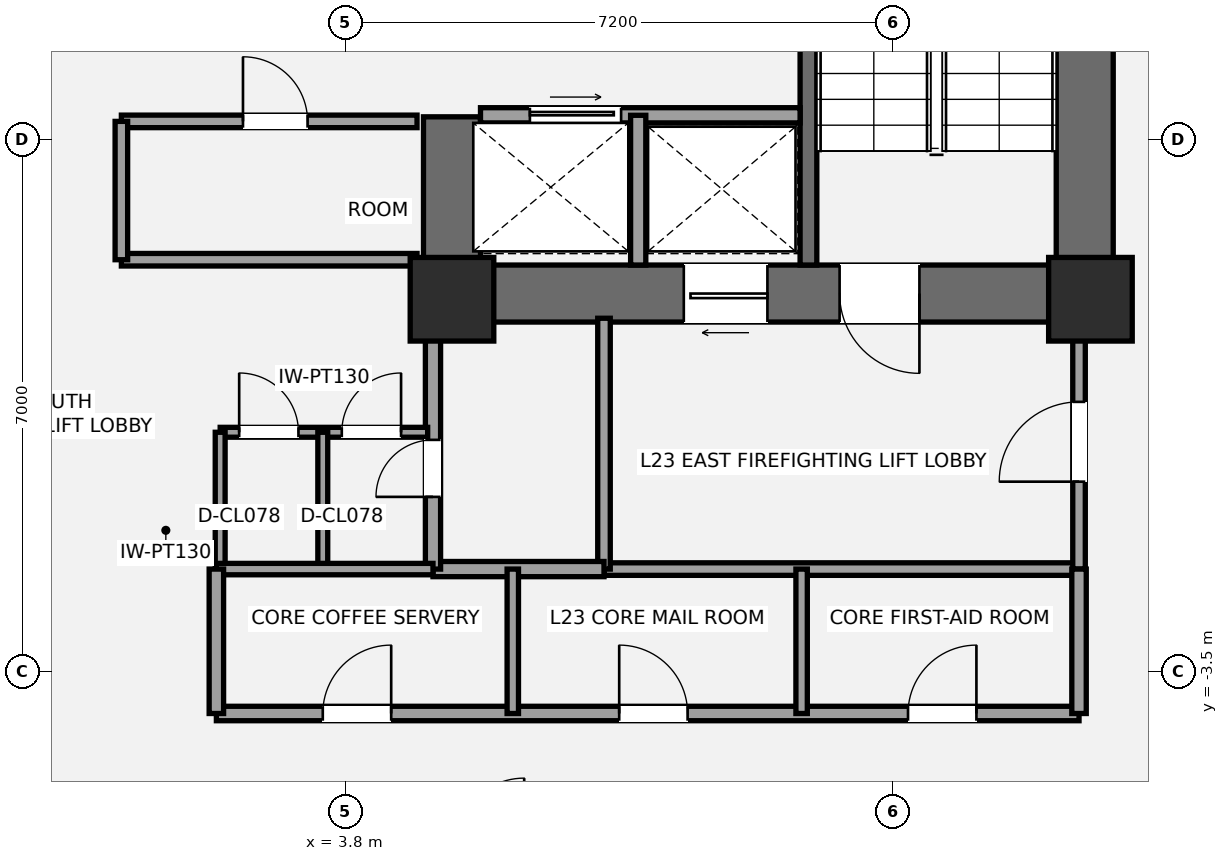
"""IFC4 building model, lengths in metres.
Left out: names, types, materials, properties, quantities, classifications, styles, units other than length and angle.
Written with IfcOpenShell. Run it as: python <this file> out.ifc"""

import sys

from ifc_helpers import new_model, si_unit, direction, frame, frame_2d, origin, origin_2d, place, context, subcontext, project, spatial, rectangle, extrude, element, fill, save


model = new_model("IFC4")
c1 = context("Model", 3, precision=1e-05, world=origin(), true_north=direction((0.0, 1.0)))
c2 = subcontext(c1, "Body", "Model", "MODEL_VIEW")
j1 = project(units=[si_unit("LENGTHUNIT", "METRE"), si_unit("PLANEANGLEUNIT", "RADIAN")], contexts=[c1])
p1 = place(None, origin())
s1 = spatial("IfcSite", under=j1, at=p1, CompositionType="ELEMENT")
p2 = place(p1, origin())
s2 = spatial("IfcBuilding", under=s1, at=p2, CompositionType="ELEMENT")
p3 = place(p2, frame((0.0, 0.0, 89.6)))
s3 = spatial("IfcBuildingStorey", under=s2, at=p3, CompositionType="ELEMENT", Elevation=89.6)
p4 = place(p3, frame((13.525, 1.1, 0.0), z_axis=(0.0, 0.0, 1.0), x_axis=(0.0, 1.0, 0.0)))
e1 = element("IfcWall", 1, at=p4, inside=s3, PredefinedType="SHEAR", context=c2, shape_type="SweptSolid", body=[
    extrude(rectangle(XDim=8.65, YDim=0.75, at=frame_2d((4.325, 0.0))), origin(), (0.0, 0.0, 1.0), 3.5),
])
p5 = place(p3, frame((13.9, 1.475, 0.0), z_axis=(0.0, 0.0, 1.0), x_axis=(-1.0, 0.0, 0.0)))
e2 = element("IfcWall", 2, at=p5, inside=s3, PredefinedType="SHEAR", context=c2, shape_type="SweptSolid", body=[
    extrude(rectangle(XDim=9.075, YDim=0.75, at=frame_2d((4.538, 0.0))), origin(), (0.0, 0.0, 1.0), 3.5),
])
p6 = place(p5, frame((2.55, 0.0, 0.0)))
e3 = element("IfcOpeningElement", 3, at=p6, cuts=e2, PredefinedType="OPENING", context=c2, shape_type="SweptSolid", body=[
    extrude(rectangle(XDim=1.05, YDim=2.15, at=frame_2d((0.525, 1.075))), frame((0.0, 0.385, 0.0), z_axis=(0.0, -1.0, 0.0), x_axis=(1.0, 0.0, 0.0)), (0.0, 0.0, 1.0), 0.77),
])
p7 = place(p5, frame((4.55, 0.0, 0.0)))
e4 = element("IfcOpeningElement", 4, at=p7, cuts=e2, PredefinedType="OPENING", context=c2, shape_type="SweptSolid", body=[
    extrude(rectangle(XDim=1.1, YDim=2.2, at=frame_2d((0.55, 1.1))), frame((0.0, 0.385, 0.0), z_axis=(0.0, -1.0, 0.0), x_axis=(1.0, 0.0, 0.0)), (0.0, 0.0, 1.0), 0.77),
])
p8 = place(p3, frame((5.2, 1.1, 0.0), z_axis=(0.0, 0.0, 1.0), x_axis=(0.0, 1.0, 0.0)))
e5 = element("IfcWall", 5, at=p8, inside=s3, PredefinedType="SHEAR", context=c2, shape_type="SweptSolid", body=[
    extrude(rectangle(XDim=2.7, YDim=0.75, at=frame_2d((1.35, 0.0))), origin(), (0.0, 0.0, 1.0), 3.5),
])
p9 = place(p3, frame((9.89, 1.85, 0.0), z_axis=(0.0, 0.0, 1.0), x_axis=(0.0, 1.0, 0.0)))
e6 = element("IfcWall", 6, at=p9, inside=s3, PredefinedType="SHEAR", context=c2, shape_type="SweptSolid", body=[
    extrude(rectangle(XDim=7.15, YDim=0.22, at=frame_2d((3.575, 0.0))), origin(), (0.0, 0.0, 1.0), 3.5),
])
for number, where, z_axis, x_axis in (
    (7, (5.2, 1.4, 0.0), (0.0, 0.0, 1.0), (1.0, 0.0, 0.0)),
    (8, (13.6, 1.4, 0.0), (0.0, 0.0, 1.0), (1.0, 0.0, 0.0)),
):
    element("IfcColumn", number, at=place(p3, frame(where, z_axis=z_axis, x_axis=x_axis)), inside=s3, PredefinedType="COLUMN", context=c2, shape_type="SweptSolid", body=[
        extrude(rectangle(XDim=1.1, YDim=1.1, at=origin_2d()), origin(), (0.0, 0.0, 1.0), 3.5),
    ])
p10 = place(p3, frame((7.2, -2.15, 0.0), z_axis=(0.0, 0.0, 1.0), x_axis=(1.0, 0.0, 0.0)))
e9 = element("IfcWall", 9, at=p10, inside=s3, PredefinedType="PARTITIONING", context=c2, shape_type="SweptSolid", body=[
    extrude(rectangle(XDim=6.25, YDim=0.165, at=frame_2d((3.125, 0.0))), origin(), (0.0, 0.0, 1.0), 3.31),
])
p11 = place(p3, frame((7.2, -2.15, 0.0), z_axis=(0.0, 0.0, 1.0), x_axis=(0.0, 1.0, 0.0)))
e10 = element("IfcWall", 10, at=p11, inside=s3, PredefinedType="PARTITIONING", context=c2, shape_type="SweptSolid", body=[
    extrude(rectangle(XDim=3.3, YDim=0.165, at=frame_2d((1.65, 0.0))), origin(), (0.0, 0.0, 1.0), 2.763),
])
p12 = place(p3, frame((13.45, -2.15, 0.0), z_axis=(0.0, 0.0, 1.0), x_axis=(0.0, 1.0, 0.0)))
e11 = element("IfcWall", 11, at=p12, inside=s3, PredefinedType="PARTITIONING", context=c2, shape_type="SweptSolid", body=[
    extrude(rectangle(XDim=3.3, YDim=0.165, at=frame_2d((1.65, 0.0))), origin(), (0.0, 0.0, 1.0), 2.763),
])
p13 = place(p12, frame((1.15, 0.0, 0.0)))
e12 = element("IfcOpeningElement", 12, at=p13, cuts=e11, PredefinedType="OPENING", context=c2, shape_type="SweptSolid", body=[
    extrude(rectangle(XDim=1.05, YDim=2.15, at=frame_2d((0.525, 1.075))), frame((0.0, 0.093, 0.0), z_axis=(0.0, -1.0, 0.0), x_axis=(1.0, 0.0, 0.0)), (0.0, 0.0, 1.0), 0.185),
])
p14 = place(p3, frame((4.95, -2.15, 0.0), z_axis=(0.0, 0.0, 1.0), x_axis=(1.0, 0.0, 0.0)))
e13 = element("IfcWall", 13, at=p14, inside=s3, PredefinedType="SOLIDWALL", context=c2, shape_type="SweptSolid", body=[
    extrude(rectangle(XDim=2.25, YDim=0.2, at=frame_2d((1.125, 0.0))), origin(), (0.0, 0.0, 1.0), 3.31),
])
p15 = place(p3, frame((4.95, -2.15, 0.0), z_axis=(0.0, 0.0, 1.0), x_axis=(0.0, 1.0, 0.0)))
e14 = element("IfcWall", 14, at=p15, inside=s3, PredefinedType="SOLIDWALL", context=c2, shape_type="SweptSolid", body=[
    extrude(rectangle(XDim=3.3, YDim=0.2, at=frame_2d((1.65, 0.0))), origin(), (0.0, 0.0, 1.0), 2.763),
])
p16 = place(p15, frame((0.95, 0.0, 0.0)))
e15 = element("IfcOpeningElement", 15, at=p16, cuts=e14, PredefinedType="OPENING", context=c2, shape_type="SweptSolid", body=[
    extrude(rectangle(XDim=0.75, YDim=2.1, at=frame_2d((0.375, 1.05))), frame((0.0, 0.11, 0.0), z_axis=(0.0, -1.0, 0.0), x_axis=(1.0, 0.0, 0.0)), (0.0, 0.0, 1.0), 0.22),
])
p17 = place(p3, frame((2.15, -0.35, 0.0), z_axis=(0.0, 0.0, 1.0), x_axis=(1.0, 0.0, 0.0)))
e16 = element("IfcWall", 16, at=p17, inside=s3, PredefinedType="PARTITIONING", context=c2, shape_type="SweptSolid", body=[
    extrude(rectangle(XDim=2.73, YDim=0.13, at=frame_2d((1.365, 0.0))), origin(), (0.0, 0.0, 1.0), 3.31),
])
p18 = place(p17, frame((0.25, 0.0, 0.0)))
e17 = element("IfcOpeningElement", 17, at=p18, cuts=e16, PredefinedType="OPENING", context=c2, shape_type="SweptSolid", body=[
    extrude(rectangle(XDim=0.78, YDim=2.1, at=frame_2d((0.39, 1.05))), frame((0.0, 0.075, 0.0), z_axis=(0.0, -1.0, 0.0), x_axis=(1.0, 0.0, 0.0)), (0.0, 0.0, 1.0), 0.15),
])
p19 = place(p17, frame((1.6, 0.0, 0.0)))
e18 = element("IfcOpeningElement", 18, at=p19, cuts=e16, PredefinedType="OPENING", context=c2, shape_type="SweptSolid", body=[
    extrude(rectangle(XDim=0.78, YDim=2.1, at=frame_2d((0.39, 1.05))), frame((0.0, 0.075, 0.0), z_axis=(0.0, -1.0, 0.0), x_axis=(1.0, 0.0, 0.0)), (0.0, 0.0, 1.0), 0.15),
])
for number, where, z_axis, x_axis in (
    (19, (2.15, -2.15, 0.0), (0.0, 0.0, 1.0), (0.0, 1.0, 0.0)),
    (20, (3.5, -2.15, 0.0), (0.0, 0.0, 1.0), (0.0, 1.0, 0.0)),
):
    element("IfcWall", number, at=place(p3, frame(where, z_axis=z_axis, x_axis=x_axis)), inside=s3, PredefinedType="PARTITIONING", context=c2, shape_type="SweptSolid", body=[
        extrude(rectangle(XDim=1.8, YDim=0.13, at=frame_2d((0.9, 0.0))), origin(), (0.0, 0.0, 1.0), 3.31),
    ])
p20 = place(p3, frame((5.575, 3.82, 0.0), z_axis=(0.0, 0.0, 1.0), x_axis=(1.0, 0.0, 0.0)))
e21 = element("IfcWall", 21, at=p20, inside=s3, PredefinedType="SOLIDWALL", context=c2, shape_type="SweptSolid", body=[
    extrude(rectangle(XDim=4.205, YDim=0.2, at=frame_2d((2.103, 0.0))), origin(), (0.0, 0.0, 1.0), 3.31),
])
p21 = place(p20, frame((0.65, 0.0, 0.0)))
e22 = element("IfcOpeningElement", 22, at=p21, cuts=e21, PredefinedType="OPENING", context=c2, shape_type="SweptSolid", body=[
    extrude(rectangle(XDim=1.2, YDim=2.2, at=frame_2d((0.6, 1.1))), frame((0.0, 0.11, 0.0), z_axis=(0.0, -1.0, 0.0), x_axis=(1.0, 0.0, 0.0)), (0.0, 0.0, 1.0), 0.22),
])
p22 = place(p3, frame((7.65, 1.85, 0.0), z_axis=(0.0, 0.0, 1.0), x_axis=(0.0, 1.0, 0.0)))
e23 = element("IfcWall", 23, at=p22, inside=s3, PredefinedType="SOLIDWALL", context=c2, shape_type="SweptSolid", body=[
    extrude(rectangle(XDim=1.97, YDim=0.2, at=frame_2d((0.985, 0.0))), origin(), (0.0, 0.0, 1.0), 3.31),
])
p23 = place(p3, frame((0.85, 1.92, 0.0), z_axis=(0.0, 0.0, 1.0), x_axis=(1.0, 0.0, 0.0)))
e24 = element("IfcWall", 24, at=p23, inside=s3, PredefinedType="PARTITIONING", context=c2, shape_type="SweptSolid", body=[
    extrude(rectangle(XDim=3.89, YDim=0.165, at=frame_2d((1.945, 0.0))), origin(), (0.0, 0.0, 1.0), 2.3),
])
p24 = place(p3, frame((0.85, 3.74, 0.0), z_axis=(0.0, 0.0, 1.0), x_axis=(1.0, 0.0, 0.0)))
e25 = element("IfcWall", 25, at=p24, inside=s3, PredefinedType="PARTITIONING", context=c2, shape_type="SweptSolid", body=[
    extrude(rectangle(XDim=3.89, YDim=0.165, at=frame_2d((1.945, 0.0))), origin(), (0.0, 0.0, 1.0), 3.31),
])
p25 = place(p24, frame((1.6, 0.0, 0.0)))
e26 = element("IfcOpeningElement", 26, at=p25, cuts=e25, PredefinedType="OPENING", context=c2, shape_type="SweptSolid", body=[
    extrude(rectangle(XDim=0.85, YDim=2.1, at=frame_2d((0.425, 1.05))), frame((0.0, 0.093, 0.0), z_axis=(0.0, -1.0, 0.0), x_axis=(1.0, 0.0, 0.0)), (0.0, 0.0, 1.0), 0.185),
])
p26 = place(p3, frame((0.85, 1.92, 0.0), z_axis=(0.0, 0.0, 1.0), x_axis=(0.0, 1.0, 0.0)))
e27 = element("IfcWall", 27, at=p26, inside=s3, PredefinedType="PARTITIONING", context=c2, shape_type="SweptSolid", body=[
    extrude(rectangle(XDim=1.82, YDim=0.165, at=frame_2d((0.91, 0.0))), origin(), (0.0, 0.0, 1.0), 3.31),
])
p27 = place(p3, frame((2.1, -4.05, 0.0), z_axis=(0.0, 0.0, 1.0), x_axis=(1.0, 0.0, 0.0)))
e28 = element("IfcWall", 28, at=p27, inside=s3, PredefinedType="PLUMBINGWALL", context=c2, shape_type="SweptSolid", body=[
    extrude(rectangle(XDim=11.35, YDim=0.19, at=frame_2d((5.675, 0.0))), origin(), (0.0, 0.0, 1.0), 2.763),
])
p28 = place(p27, frame((1.4, 0.0, 0.0)))
e29 = element("IfcOpeningElement", 29, at=p28, cuts=e28, PredefinedType="OPENING", context=c2, shape_type="SweptSolid", body=[
    extrude(rectangle(XDim=0.9, YDim=2.1, at=frame_2d((0.45, 1.05))), frame((0.0, 0.105, 0.0), z_axis=(0.0, -1.0, 0.0), x_axis=(1.0, 0.0, 0.0)), (0.0, 0.0, 1.0), 0.21),
])
p29 = place(p27, frame((5.3, 0.0, 0.0)))
e30 = element("IfcOpeningElement", 30, at=p29, cuts=e28, PredefinedType="OPENING", context=c2, shape_type="SweptSolid", body=[
    extrude(rectangle(XDim=0.9, YDim=2.1, at=frame_2d((0.45, 1.05))), frame((0.0, 0.105, 0.0), z_axis=(0.0, -1.0, 0.0), x_axis=(1.0, 0.0, 0.0)), (0.0, 0.0, 1.0), 0.21),
])
p30 = place(p27, frame((9.1, 0.0, 0.0)))
e31 = element("IfcOpeningElement", 31, at=p30, cuts=e28, PredefinedType="OPENING", context=c2, shape_type="SweptSolid", body=[
    extrude(rectangle(XDim=0.9, YDim=2.1, at=frame_2d((0.45, 1.05))), frame((0.0, 0.105, 0.0), z_axis=(0.0, -1.0, 0.0), x_axis=(1.0, 0.0, 0.0)), (0.0, 0.0, 1.0), 0.21),
])
p31 = place(p3, frame((2.1, -2.15, 0.0), z_axis=(0.0, 0.0, 1.0), x_axis=(1.0, 0.0, 0.0)))
e32 = element("IfcWall", 32, at=p31, inside=s3, PredefinedType="PLUMBINGWALL", context=c2, shape_type="SweptSolid", body=[
    extrude(rectangle(XDim=2.85, YDim=0.15, at=frame_2d((1.425, 0.0))), origin(), (0.0, 0.0, 1.0), 3.31),
])
for number, where, z_axis, x_axis in (
    (33, (2.1, -4.05, 0.0), (0.0, 0.0, 1.0), (0.0, 1.0, 0.0)),
    (34, (13.45, -4.05, 0.0), (0.0, 0.0, 1.0), (0.0, 1.0, 0.0)),
):
    element("IfcWall", number, at=place(p3, frame(where, z_axis=z_axis, x_axis=x_axis)), inside=s3, PredefinedType="PLUMBINGWALL", context=c2, shape_type="SweptSolid", body=[
        extrude(rectangle(XDim=1.9, YDim=0.19, at=frame_2d((0.95, 0.0))), origin(), (0.0, 0.0, 1.0), 3.31),
    ])
p32 = place(p3, frame((6.0, -4.05, 0.0), z_axis=(0.0, 0.0, 1.0), x_axis=(0.0, 1.0, 0.0)))
e35 = element("IfcWall", 35, at=p32, inside=s3, PredefinedType="PLUMBINGWALL", context=c2, shape_type="SweptSolid", body=[
    extrude(rectangle(XDim=1.9, YDim=0.15, at=frame_2d((0.95, 0.0))), origin(), (0.0, 0.0, 1.0), 2.751),
])
p33 = place(p3, frame((9.8, -4.05, 0.0), z_axis=(0.0, 0.0, 1.0), x_axis=(0.0, 1.0, 0.0)))
e36 = element("IfcWall", 36, at=p33, inside=s3, PredefinedType="PLUMBINGWALL", context=c2, shape_type="SweptSolid", body=[
    extrude(rectangle(XDim=1.9, YDim=0.15, at=frame_2d((0.95, 0.0))), origin(), (0.0, 0.0, 1.0), 2.763),
])
p34 = place(p6, origin())
e37 = element("IfcDoor", 37, at=p34, inside=s3, OperationType="SINGLE_SWING_LEFT", PredefinedType="DOOR", context=c2, shape_type="SweptSolid", body=[
    extrude(rectangle(XDim=1.05, YDim=2.15, at=frame_2d((0.525, 1.075))), frame((0.0, 0.025, 0.0), z_axis=(0.0, -1.0, 0.0), x_axis=(1.0, 0.0, 0.0)), (0.0, 0.0, 1.0), 0.05),
])
fill(e3, e37)
p35 = place(p13, origin())
e38 = element("IfcDoor", 38, at=p35, inside=s3, OperationType="SINGLE_SWING_LEFT", PredefinedType="DOOR", context=c2, shape_type="SweptSolid", body=[
    extrude(rectangle(XDim=1.05, YDim=2.15, at=frame_2d((0.525, 1.075))), frame((0.0, 0.025, 0.0), z_axis=(0.0, -1.0, 0.0), x_axis=(1.0, 0.0, 0.0)), (0.0, 0.0, 1.0), 0.05),
])
fill(e12, e38)
p36 = place(p16, origin())
e39 = element("IfcDoor", 39, at=p36, inside=s3, OperationType="SINGLE_SWING_LEFT", PredefinedType="DOOR", context=c2, shape_type="SweptSolid", body=[
    extrude(rectangle(XDim=0.75, YDim=2.1, at=frame_2d((0.375, 1.05))), frame((0.0, 0.025, 0.0), z_axis=(0.0, -1.0, 0.0), x_axis=(1.0, 0.0, 0.0)), (0.0, 0.0, 1.0), 0.05),
])
fill(e15, e39)
p37 = place(p18, origin())
e40 = element("IfcDoor", 40, at=p37, inside=s3, OperationType="SINGLE_SWING_LEFT", PredefinedType="DOOR", context=c2, shape_type="SweptSolid", body=[
    extrude(rectangle(XDim=0.78, YDim=2.1, at=frame_2d((0.39, 1.05))), frame((0.0, 0.025, 0.0), z_axis=(0.0, -1.0, 0.0), x_axis=(1.0, 0.0, 0.0)), (0.0, 0.0, 1.0), 0.05),
])
fill(e17, e40)
p38 = place(p19, origin())
e41 = element("IfcDoor", 41, at=p38, inside=s3, OperationType="SINGLE_SWING_RIGHT", PredefinedType="DOOR", context=c2, shape_type="SweptSolid", body=[
    extrude(rectangle(XDim=0.78, YDim=2.1, at=frame_2d((0.39, 1.05))), frame((0.0, 0.025, 0.0), z_axis=(0.0, -1.0, 0.0), x_axis=(1.0, 0.0, 0.0)), (0.0, 0.0, 1.0), 0.05),
])
fill(e18, e41)
p39 = place(p7, origin())
e42 = element("IfcDoor", 42, at=p39, inside=s3, OperationType="SLIDING_TO_LEFT", PredefinedType="DOOR", context=c2, shape_type="SweptSolid", body=[
    extrude(rectangle(XDim=1.1, YDim=2.2, at=frame_2d((0.55, 1.1))), frame((0.0, 0.025, 0.0), z_axis=(0.0, -1.0, 0.0), x_axis=(1.0, 0.0, 0.0)), (0.0, 0.0, 1.0), 0.05),
])
fill(e4, e42)
p40 = place(p21, origin())
e43 = element("IfcDoor", 43, at=p40, inside=s3, OperationType="SLIDING_TO_RIGHT", PredefinedType="DOOR", context=c2, shape_type="SweptSolid", body=[
    extrude(rectangle(XDim=1.2, YDim=2.2, at=frame_2d((0.6, 1.1))), frame((0.0, 0.025, 0.0), z_axis=(0.0, -1.0, 0.0), x_axis=(1.0, 0.0, 0.0)), (0.0, 0.0, 1.0), 0.05),
])
fill(e22, e43)
p41 = place(p25, origin())
e44 = element("IfcDoor", 44, at=p41, inside=s3, OperationType="SINGLE_SWING_LEFT", PredefinedType="DOOR", context=c2, shape_type="SweptSolid", body=[
    extrude(rectangle(XDim=0.85, YDim=2.1, at=frame_2d((0.425, 1.05))), frame((0.0, 0.025, 0.0), z_axis=(0.0, -1.0, 0.0), x_axis=(1.0, 0.0, 0.0)), (0.0, 0.0, 1.0), 0.05),
])
fill(e26, e44)
p42 = place(p28, origin())
e45 = element("IfcDoor", 45, at=p42, inside=s3, OperationType="SINGLE_SWING_RIGHT", PredefinedType="DOOR", context=c2, shape_type="SweptSolid", body=[
    extrude(rectangle(XDim=0.9, YDim=2.1, at=frame_2d((0.45, 1.05))), frame((0.0, 0.025, 0.0), z_axis=(0.0, -1.0, 0.0), x_axis=(1.0, 0.0, 0.0)), (0.0, 0.0, 1.0), 0.05),
])
fill(e29, e45)
p43 = place(p29, origin())
e46 = element("IfcDoor", 46, at=p43, inside=s3, OperationType="SINGLE_SWING_LEFT", PredefinedType="DOOR", context=c2, shape_type="SweptSolid", body=[
    extrude(rectangle(XDim=0.9, YDim=2.1, at=frame_2d((0.45, 1.05))), frame((0.0, 0.025, 0.0), z_axis=(0.0, -1.0, 0.0), x_axis=(1.0, 0.0, 0.0)), (0.0, 0.0, 1.0), 0.05),
])
fill(e30, e46)
p44 = place(p30, origin())
e47 = element("IfcDoor", 47, at=p44, inside=s3, OperationType="SINGLE_SWING_RIGHT", PredefinedType="DOOR", context=c2, shape_type="SweptSolid", body=[
    extrude(rectangle(XDim=0.9, YDim=2.1, at=frame_2d((0.45, 1.05))), frame((0.0, 0.025, 0.0), z_axis=(0.0, -1.0, 0.0), x_axis=(1.0, 0.0, 0.0)), (0.0, 0.0, 1.0), 0.05),
])
fill(e31, e47)
save(model, sys.argv[1])
